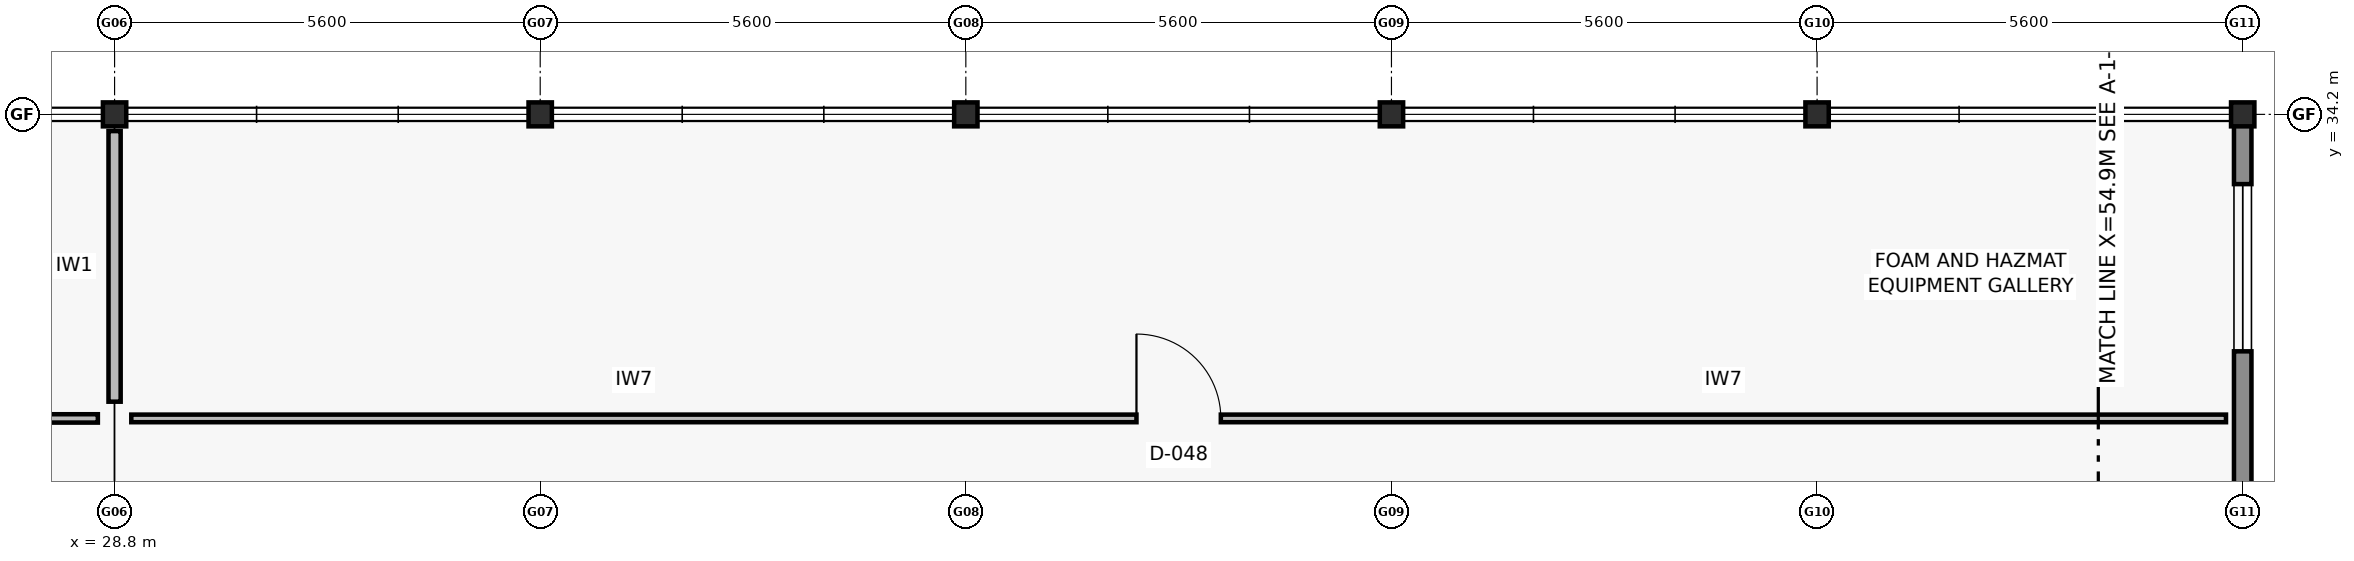
"""IFC4 building model, lengths in metres.
Left out: names, types, materials, properties, quantities, classifications, styles, units other than length and angle.
Written with IfcOpenShell. Run it as: python <this file> out.ifc"""

import sys

from ifc_helpers import new_model, si_unit, direction, frame, frame_2d, origin, origin_2d, place, context, subcontext, project, spatial, rectangle, i_section, extrude, element, fill, save


model = new_model("IFC4")
c1 = context("Model", 3, precision=1e-05, world=origin(), true_north=direction((0.0, 1.0)))
c2 = subcontext(c1, "Body", "Model", "MODEL_VIEW")
j1 = project(units=[si_unit("LENGTHUNIT", "METRE"), si_unit("PLANEANGLEUNIT", "RADIAN")], contexts=[c1])
p1 = place(None, origin())
s1 = spatial("IfcSite", under=j1, at=p1, CompositionType="ELEMENT")
p2 = place(p1, origin())
s2 = spatial("IfcBuilding", under=s1, at=p2, CompositionType="ELEMENT")
p3 = place(p2, frame((0.0, 0.0, 5.4)))
s3 = spatial("IfcBuildingStorey", under=s2, at=p3, CompositionType="ELEMENT", Elevation=5.4)
for number, where, z_axis, x_axis in (
    (1, (28.8, 34.2, 0.0), (0.0, 0.0, 1.0), (1.0, 0.0, 0.0)),
    (2, (34.4, 34.2, 0.0), (0.0, 0.0, 1.0), (1.0, 0.0, 0.0)),
    (3, (40.0, 34.2, 0.0), (0.0, 0.0, 1.0), (1.0, 0.0, 0.0)),
    (4, (45.6, 34.2, 0.0), (0.0, 0.0, 1.0), (1.0, 0.0, 0.0)),
    (5, (51.2, 34.2, 0.0), (0.0, 0.0, 1.0), (1.0, 0.0, 0.0)),
    (6, (56.8, 34.2, 0.0), (0.0, 0.0, 1.0), (1.0, 0.0, 0.0)),
):
    element("IfcColumn", number, at=place(p3, frame(where, z_axis=z_axis, x_axis=x_axis)), inside=s3, PredefinedType="COLUMN", context=c2, shape_type="SweptSolid", body=[
        extrude(i_section(OverallWidth=0.307, OverallDepth=0.315, WebThickness=0.012, FlangeThickness=0.019, FilletRadius=0.017, at=origin_2d()), origin(), (0.0, 0.0, 1.0), 4.2),
    ])
p4 = place(p3, frame((56.8, 34.195, 0.0), z_axis=(0.0, 0.0, 1.0), x_axis=(0.0, -1.0, 0.0)))
e7 = element("IfcWall", 7, at=p4, inside=s3, PredefinedType="SOLIDWALL", context=c2, shape_type="SweptSolid", body=[
    extrude(rectangle(XDim=6.59, YDim=0.23, at=frame_2d((3.295, 0.0))), origin(), (0.0, 0.0, 1.0), 3.32),
])
p5 = place(p4, frame((0.913, 0.0, 0.8)))
e8 = element("IfcOpeningElement", 8, at=p5, cuts=e7, PredefinedType="OPENING", context=c2, shape_type="SweptSolid", body=[
    extrude(rectangle(XDim=2.2, YDim=1.8, at=frame_2d((1.1, 0.9))), frame((0.0, 0.125, 0.0), z_axis=(0.0, -1.0, 0.0), x_axis=(1.0, 0.0, 0.0)), (0.0, 0.0, 1.0), 0.25),
])
p6 = place(p3, frame((1.02, 30.2, 0.0), z_axis=(0.0, 0.0, 1.0), x_axis=(1.0, 0.0, 0.0)))
e9 = element("IfcWall", 9, at=p6, inside=s3, PredefinedType="PARTITIONING", context=c2, shape_type="SweptSolid", body=[
    extrude(rectangle(XDim=27.56, YDim=0.11, at=frame_2d((13.78, 0.0))), origin(), (0.0, 0.0, 1.0), 3.3),
])
p7 = place(p6, frame((13.245, 0.0, 0.0)))
e10 = element("IfcOpeningElement", 10, at=p7, cuts=e9, PredefinedType="OPENING", context=c2, shape_type="SweptSolid", body=[
    extrude(rectangle(XDim=1.07, YDim=2.08, at=frame_2d((0.535, 1.04))), frame((0.0, 0.065, 0.0), z_axis=(0.0, -1.0, 0.0), x_axis=(1.0, 0.0, 0.0)), (0.0, 0.0, 1.0), 0.13),
])
p8 = place(p3, frame((29.02, 30.2, 0.0), z_axis=(0.0, 0.0, 1.0), x_axis=(1.0, 0.0, 0.0)))
e11 = element("IfcWall", 11, at=p8, inside=s3, PredefinedType="PARTITIONING", context=c2, shape_type="SweptSolid", body=[
    extrude(rectangle(XDim=27.56, YDim=0.1, at=frame_2d((13.78, 0.0))), origin(), (0.0, 0.0, 1.0), 3.3),
])
p9 = place(p8, frame((13.225, 0.0, 0.0)))
e12 = element("IfcOpeningElement", 12, at=p9, cuts=e11, PredefinedType="OPENING", context=c2, shape_type="SweptSolid", body=[
    extrude(rectangle(XDim=1.11, YDim=2.1, at=frame_2d((0.555, 1.05))), frame((0.0, 0.06, 0.0), z_axis=(0.0, -1.0, 0.0), x_axis=(1.0, 0.0, 0.0)), (0.0, 0.0, 1.0), 0.12),
])
p10 = place(p3, frame((28.8, 30.42, 0.0), z_axis=(0.0, 0.0, 1.0), x_axis=(0.0, 1.0, 0.0)))
e13 = element("IfcWall", 13, at=p10, inside=s3, PredefinedType="PARTITIONING", context=c2, shape_type="SweptSolid", body=[
    extrude(rectangle(XDim=3.56, YDim=0.16, at=frame_2d((1.78, 0.0))), origin(), (0.0, 0.0, 1.0), 3.3),
])
p11 = place(p5, origin())
e14 = element("IfcWindow", 14, at=p11, inside=s3, PartitioningType="DOUBLE_PANEL_VERTICAL", PredefinedType="WINDOW", context=c2, shape_type="SweptSolid", body=[
    extrude(rectangle(XDim=2.2, YDim=1.8, at=frame_2d((1.1, 0.9))), frame((0.0, 0.03, 0.0), z_axis=(0.0, -1.0, 0.0), x_axis=(1.0, 0.0, 0.0)), (0.0, 0.0, 1.0), 0.06),
])
fill(e8, e14)
p12 = place(p9, origin())
e15 = element("IfcDoor", 15, at=p12, inside=s3, OperationType="SINGLE_SWING_LEFT", PredefinedType="DOOR", context=c2, shape_type="SweptSolid", body=[
    extrude(rectangle(XDim=1.11, YDim=2.1, at=frame_2d((0.555, 1.05))), frame((0.0, 0.025, 0.0), z_axis=(0.0, -1.0, 0.0), x_axis=(1.0, 0.0, 0.0)), (0.0, 0.0, 1.0), 0.05),
])
fill(e12, e15)
save(model, sys.argv[1])
